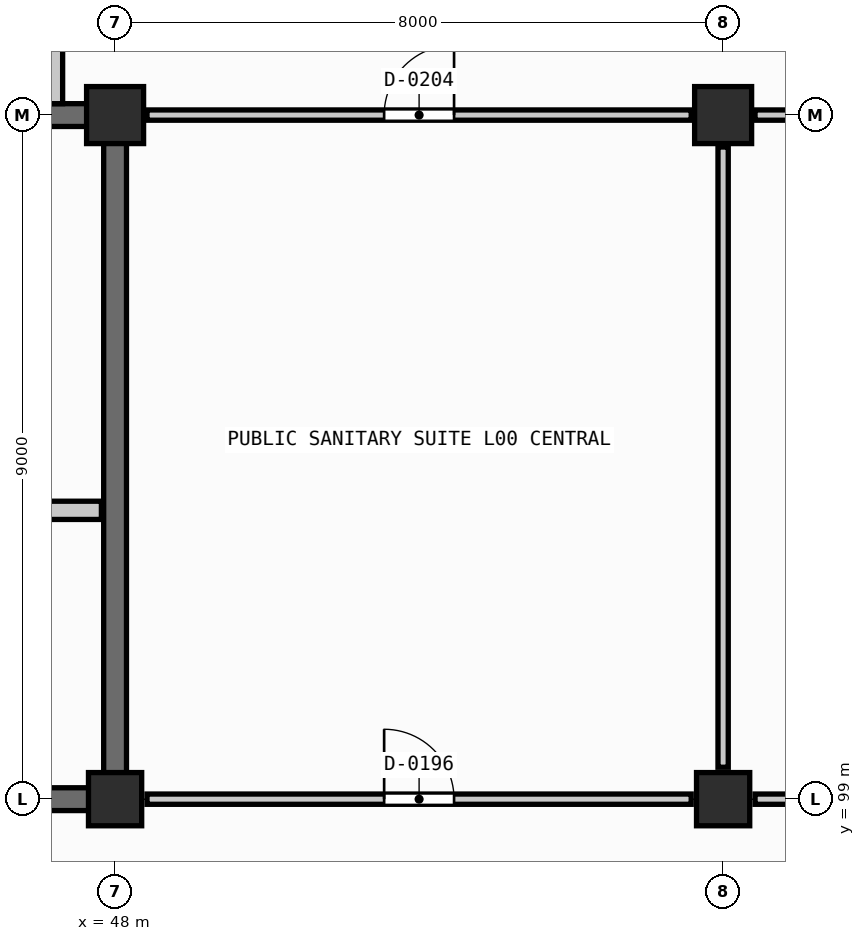
"""IFC4 building model, lengths in metres.
Left out: names, types, materials, properties, quantities, classifications, styles, units other than length and angle.
Written with IfcOpenShell. Run it as: python <this file> out.ifc"""

import sys

from ifc_helpers import new_model, si_unit, direction, frame, frame_2d, origin, origin_2d, place, context, subcontext, project, spatial, rectangle, extrude, element, fill, save


model = new_model("IFC4")
c1 = context("Model", 3, precision=1e-05, world=origin(), true_north=direction((0.0, 1.0)))
c2 = subcontext(c1, "Body", "Model", "MODEL_VIEW")
j1 = project(units=[si_unit("LENGTHUNIT", "METRE"), si_unit("PLANEANGLEUNIT", "RADIAN")], contexts=[c1])
p1 = place(None, origin())
s1 = spatial("IfcSite", under=j1, at=p1, CompositionType="ELEMENT")
p2 = place(p1, origin())
s2 = spatial("IfcBuilding", under=s1, at=p2, CompositionType="ELEMENT")
p3 = place(p2, origin())
s3 = spatial("IfcBuildingStorey", under=s2, at=p3, CompositionType="ELEMENT", Elevation=0.0)
p4 = place(p3, frame((48.0, 99.0, -1.25), z_axis=(0.0, 0.0, 1.0), x_axis=(1.0, 0.0, 0.0)))
e1 = element("IfcColumn", 1, at=p4, inside=s3, PredefinedType="COLUMN", context=c2, shape_type="SweptSolid", body=[
    extrude(rectangle(XDim=0.7, YDim=0.7, at=origin_2d()), origin(), (0.0, 0.0, 1.0), 6.05),
])
p5 = place(p3, frame((48.0, 108.0, -1.25), z_axis=(0.0, 0.0, 1.0), x_axis=(1.0, 0.0, 0.0)))
e2 = element("IfcColumn", 2, at=p5, inside=s3, PredefinedType="COLUMN", context=c2, shape_type="SweptSolid", body=[
    extrude(rectangle(XDim=0.75, YDim=0.75, at=origin_2d()), origin(), (0.0, 0.0, 1.0), 6.05),
])
p6 = place(p3, frame((56.0, 99.0, -1.25), z_axis=(0.0, 0.0, 1.0), x_axis=(1.0, 0.0, 0.0)))
e3 = element("IfcColumn", 3, at=p6, inside=s3, PredefinedType="COLUMN", context=c2, shape_type="SweptSolid", body=[
    extrude(rectangle(XDim=0.7, YDim=0.7, at=origin_2d()), origin(), (0.0, 0.0, 1.0), 6.05),
])
p7 = place(p3, frame((56.0, 108.0, -1.25), z_axis=(0.0, 0.0, 1.0), x_axis=(1.0, 0.0, 0.0)))
e4 = element("IfcColumn", 4, at=p7, inside=s3, PredefinedType="COLUMN", context=c2, shape_type="SweptSolid", body=[
    extrude(rectangle(XDim=0.75, YDim=0.75, at=origin_2d()), origin(), (0.0, 0.0, 1.0), 6.05),
])
p8 = place(p3, frame((40.345, 99.0, -1.25), z_axis=(0.0, 0.0, 1.0), x_axis=(1.0, 0.0, 0.0)))
e5 = element("IfcWall", 5, at=p8, inside=s3, PredefinedType="SHEAR", context=c2, shape_type="SweptSolid", body=[
    extrude(rectangle(XDim=7.31, YDim=0.3, at=frame_2d((3.655, 0.0))), origin(), (0.0, 0.0, 1.0), 5.805),
])
p9 = place(p3, frame((40.37, 108.0, -1.25), z_axis=(0.0, 0.0, 1.0), x_axis=(1.0, 0.0, 0.0)))
e6 = element("IfcWall", 6, at=p9, inside=s3, PredefinedType="SHEAR", context=c2, shape_type="SweptSolid", body=[
    extrude(rectangle(XDim=7.26, YDim=0.3, at=frame_2d((3.63, 0.0))), origin(), (0.0, 0.0, 1.0), 5.805),
])
p10 = place(p9, frame((4.7, 0.0, 1.25)))
e7 = element("IfcOpeningElement", 7, at=p10, cuts=e6, PredefinedType="OPENING", context=c2, shape_type="SweptSolid", body=[
    extrude(rectangle(XDim=1.7, YDim=2.25, at=frame_2d((0.85, 1.125))), frame((0.0, 0.16, 0.0), z_axis=(0.0, -1.0, 0.0), x_axis=(1.0, 0.0, 0.0)), (0.0, 0.0, 1.0), 0.32),
])
p11 = place(p3, frame((48.0, 99.345, -1.25), z_axis=(0.0, 0.0, 1.0), x_axis=(0.0, 1.0, 0.0)))
e8 = element("IfcWall", 8, at=p11, inside=s3, PredefinedType="SHEAR", context=c2, shape_type="SweptSolid", body=[
    extrude(rectangle(XDim=8.285, YDim=0.3, at=frame_2d((4.143, 0.0))), origin(), (0.0, 0.0, 1.0), 5.805),
])
p12 = place(p3, frame((44.75, 102.8, 0.0), z_axis=(0.0, 0.0, 1.0), x_axis=(1.0, 0.0, 0.0)))
e9 = element("IfcWall", 9, at=p12, inside=s3, PredefinedType="SHEAR", context=c2, shape_type="SweptSolid", body=[
    extrude(rectangle(XDim=3.07, YDim=0.24, at=frame_2d((1.535, 0.0))), origin(), (0.0, 0.0, 1.0), 3.905),
])
p13 = place(p12, frame((1.035, 0.0, 0.0)))
e10 = element("IfcOpeningElement", 10, at=p13, cuts=e9, PredefinedType="OPENING", context=c2, shape_type="SweptSolid", body=[
    extrude(rectangle(XDim=1.0, YDim=2.15, at=frame_2d((0.5, 1.075))), frame((0.0, 0.13, 0.0), z_axis=(0.0, -1.0, 0.0), x_axis=(1.0, 0.0, 0.0)), (0.0, 0.0, 1.0), 0.26),
])
p14 = place(p3, frame((48.42, 99.0, 0.0), z_axis=(0.0, 0.0, 1.0), x_axis=(1.0, 0.0, 0.0)))
e11 = element("IfcWall", 11, at=p14, inside=s3, PredefinedType="PLUMBINGWALL", context=c2, shape_type="SweptSolid", body=[
    extrude(rectangle(XDim=7.16, YDim=0.135, at=frame_2d((3.58, 0.0))), origin(), (0.0, 0.0, 1.0), 3.65),
])
p15 = place(p14, frame((3.12, 0.0, 0.0)))
e12 = element("IfcOpeningElement", 12, at=p15, cuts=e11, PredefinedType="OPENING", context=c2, shape_type="SweptSolid", body=[
    extrude(rectangle(XDim=0.92, YDim=2.08, at=frame_2d((0.46, 1.04))), frame((0.0, 0.078, 0.0), z_axis=(0.0, -1.0, 0.0), x_axis=(1.0, 0.0, 0.0)), (0.0, 0.0, 1.0), 0.155),
])
p16 = place(p3, frame((56.42, 99.0, 0.0), z_axis=(0.0, 0.0, 1.0), x_axis=(1.0, 0.0, 0.0)))
e13 = element("IfcWall", 13, at=p16, inside=s3, PredefinedType="PLUMBINGWALL", context=c2, shape_type="SweptSolid", body=[
    extrude(rectangle(XDim=6.76, YDim=0.135, at=frame_2d((3.38, 0.0))), origin(), (0.0, 0.0, 1.0), 3.65),
])
p17 = place(p16, frame((2.855, 0.0, 0.0)))
e14 = element("IfcOpeningElement", 14, at=p17, cuts=e13, PredefinedType="OPENING", context=c2, shape_type="SweptSolid", body=[
    extrude(rectangle(XDim=1.05, YDim=2.1, at=frame_2d((0.525, 1.05))), frame((0.0, 0.078, 0.0), z_axis=(0.0, -1.0, 0.0), x_axis=(1.0, 0.0, 0.0)), (0.0, 0.0, 1.0), 0.155),
])
p18 = place(p3, frame((56.0, 99.42, 0.0), z_axis=(0.0, 0.0, 1.0), x_axis=(0.0, 1.0, 0.0)))
e15 = element("IfcWall", 15, at=p18, inside=s3, PredefinedType="PLUMBINGWALL", context=c2, shape_type="SweptSolid", body=[
    extrude(rectangle(XDim=8.16, YDim=0.135, at=frame_2d((4.08, 0.0))), origin(), (0.0, 0.0, 1.0), 3.65),
])
p19 = place(p3, frame((48.42, 108.0, 0.0), z_axis=(0.0, 0.0, 1.0), x_axis=(1.0, 0.0, 0.0)))
e16 = element("IfcWall", 16, at=p19, inside=s3, PredefinedType="PLUMBINGWALL", context=c2, shape_type="SweptSolid", body=[
    extrude(rectangle(XDim=7.16, YDim=0.135, at=frame_2d((3.58, 0.0))), origin(), (0.0, 0.0, 1.0), 3.65),
])
p20 = place(p19, frame((3.12, 0.0, 0.0)))
e17 = element("IfcOpeningElement", 17, at=p20, cuts=e16, PredefinedType="OPENING", context=c2, shape_type="SweptSolid", body=[
    extrude(rectangle(XDim=0.92, YDim=2.08, at=frame_2d((0.46, 1.04))), frame((0.0, 0.078, 0.0), z_axis=(0.0, -1.0, 0.0), x_axis=(1.0, 0.0, 0.0)), (0.0, 0.0, 1.0), 0.155),
])
p21 = place(p3, frame((56.42, 108.0, 0.0), z_axis=(0.0, 0.0, 1.0), x_axis=(1.0, 0.0, 0.0)))
e18 = element("IfcWall", 18, at=p21, inside=s3, PredefinedType="PLUMBINGWALL", context=c2, shape_type="SweptSolid", body=[
    extrude(rectangle(XDim=6.76, YDim=0.135, at=frame_2d((3.38, 0.0))), origin(), (0.0, 0.0, 1.0), 3.65),
])
p22 = place(p21, frame((2.84, 0.0, 0.0)))
e19 = element("IfcOpeningElement", 19, at=p22, cuts=e18, PredefinedType="OPENING", context=c2, shape_type="SweptSolid", body=[
    extrude(rectangle(XDim=1.08, YDim=2.12, at=frame_2d((0.54, 1.06))), frame((0.0, 0.078, 0.0), z_axis=(0.0, -1.0, 0.0), x_axis=(1.0, 0.0, 0.0)), (0.0, 0.0, 1.0), 0.155),
])
p23 = place(p3, frame((47.2, 108.15, 0.0), z_axis=(0.0, 0.0, 1.0), x_axis=(0.0, 1.0, 0.0)))
e20 = element("IfcWall", 20, at=p23, inside=s3, PredefinedType="SOLIDWALL", context=c2, shape_type="SweptSolid", body=[
    extrude(rectangle(XDim=2.36, YDim=0.22, at=frame_2d((1.18, 0.0))), origin(), (0.0, 0.0, 1.0), 3.65),
])
p24 = place(p15, origin())
e21 = element("IfcDoor", 21, at=p24, inside=s3, OperationType="SINGLE_SWING_LEFT", PredefinedType="DOOR", context=c2, shape_type="SweptSolid", body=[
    extrude(rectangle(XDim=0.92, YDim=2.08, at=frame_2d((0.46, 1.04))), frame((0.0, 0.025, 0.0), z_axis=(0.0, -1.0, 0.0), x_axis=(1.0, 0.0, 0.0)), (0.0, 0.0, 1.0), 0.05),
])
fill(e12, e21)
p25 = place(p20, origin())
e22 = element("IfcDoor", 22, at=p25, inside=s3, OperationType="SINGLE_SWING_RIGHT", PredefinedType="DOOR", context=c2, shape_type="SweptSolid", body=[
    extrude(rectangle(XDim=0.92, YDim=2.08, at=frame_2d((0.46, 1.04))), frame((0.0, 0.025, 0.0), z_axis=(0.0, -1.0, 0.0), x_axis=(1.0, 0.0, 0.0)), (0.0, 0.0, 1.0), 0.05),
])
fill(e17, e22)
save(model, sys.argv[1])
